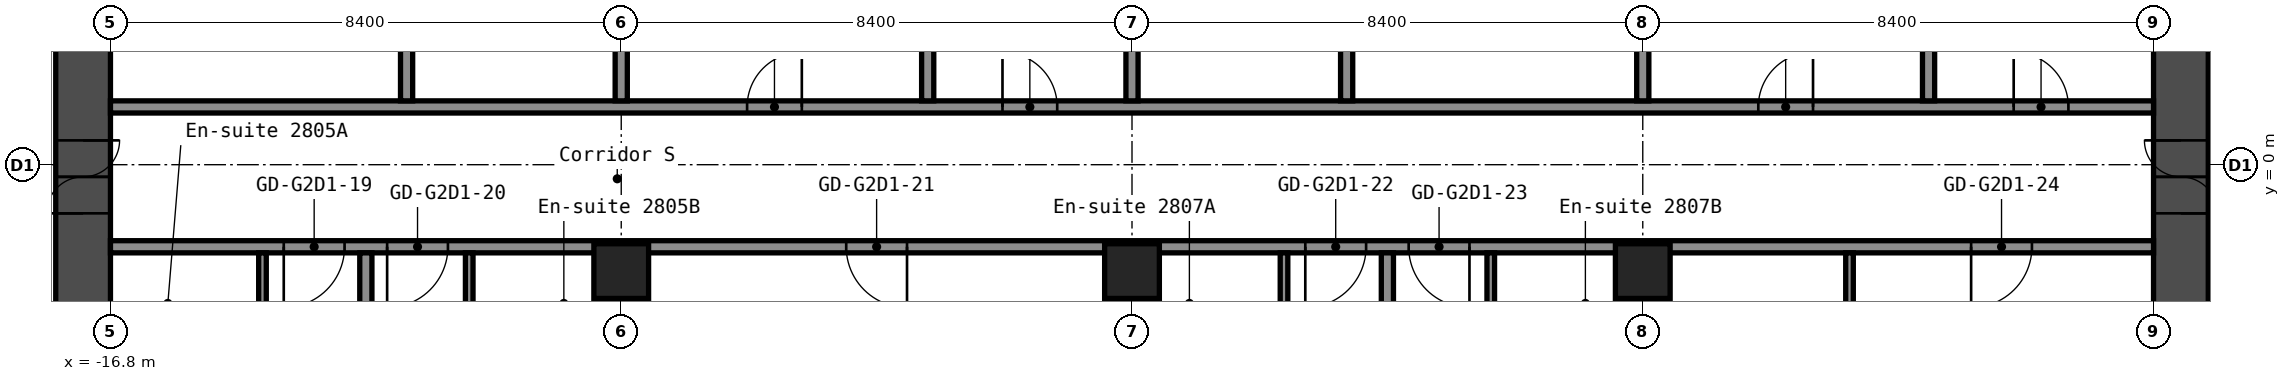
"""IFC4 building model, lengths in metres.
Left out: names, types, materials, properties, quantities, classifications, styles, units other than length and angle.
Written with IfcOpenShell. Run it as: python <this file> out.ifc"""

import sys

from ifc_helpers import new_model, si_unit, direction, frame, frame_2d, origin, origin_2d, place, context, subcontext, project, spatial, rectangle, hollow_rectangle, extrude, element, fill, save


model = new_model("IFC4")
c1 = context("Model", 3, precision=1e-05, world=origin(), true_north=direction((0.0, 1.0)))
c2 = subcontext(c1, "Body", "Model", "MODEL_VIEW")
j1 = project(units=[si_unit("LENGTHUNIT", "METRE"), si_unit("PLANEANGLEUNIT", "RADIAN")], contexts=[c1])
p1 = place(None, origin())
s1 = spatial("IfcSite", under=j1, at=p1, CompositionType="ELEMENT")
p2 = place(p1, origin())
s2 = spatial("IfcBuilding", under=s1, at=p2, CompositionType="ELEMENT")
p3 = place(p2, frame((0.0, 0.0, 101.0)))
s3 = spatial("IfcBuildingStorey", under=s2, at=p3, CompositionType="ELEMENT", Elevation=101.0)
for number, where, z_axis, x_axis in (
    (1, (-8.4, -1.75, 0.0), (0.0, 0.0, 1.0), (1.0, 0.0, 0.0)),
    (2, (0.0, -1.75, 0.0), (0.0, 0.0, 1.0), (1.0, 0.0, 0.0)),
    (3, (8.4, -1.75, 0.0), (0.0, 0.0, 1.0), (1.0, 0.0, 0.0)),
):
    element("IfcColumn", number, at=place(p3, frame(where, z_axis=z_axis, x_axis=x_axis)), inside=s3, PredefinedType="COLUMN", context=c2, shape_type="SweptSolid", body=[
        extrude(hollow_rectangle(XDim=0.9, YDim=0.9, WallThickness=0.036, at=origin_2d()), origin(), (0.0, 0.0, 1.0), 2.8),
    ])
p4 = place(p3, frame((-17.25, -8.4, 0.0), z_axis=(0.0, 0.0, 1.0), x_axis=(0.0, 1.0, 0.0)))
e4 = element("IfcWall", 4, at=p4, inside=s3, PredefinedType="SHEAR", context=c2, shape_type="SweptSolid", body=[
    extrude(rectangle(XDim=16.8, YDim=0.9, at=frame_2d((8.4, 0.0))), origin(), (0.0, 0.0, 1.0), 2.8),
])
p5 = place(p4, frame((7.6, 0.0, 0.0)))
e5 = element("IfcOpeningElement", 5, at=p5, cuts=e4, PredefinedType="OPENING", context=c2, shape_type="SweptSolid", body=[
    extrude(rectangle(XDim=1.2, YDim=2.1, at=frame_2d((0.6, 1.05))), frame((0.0, 0.46, 0.0), z_axis=(0.0, -1.0, 0.0), x_axis=(1.0, 0.0, 0.0)), (0.0, 0.0, 1.0), 0.92),
])
p6 = place(p3, frame((17.25, -8.4, 0.0), z_axis=(0.0, 0.0, 1.0), x_axis=(0.0, 1.0, 0.0)))
e6 = element("IfcWall", 6, at=p6, inside=s3, PredefinedType="SHEAR", context=c2, shape_type="SweptSolid", body=[
    extrude(rectangle(XDim=16.8, YDim=0.9, at=frame_2d((8.4, 0.0))), origin(), (0.0, 0.0, 1.0), 2.8),
])
p7 = place(p6, frame((7.6, 0.0, 0.0)))
e7 = element("IfcOpeningElement", 7, at=p7, cuts=e6, PredefinedType="OPENING", context=c2, shape_type="SweptSolid", body=[
    extrude(rectangle(XDim=1.2, YDim=2.1, at=frame_2d((0.6, 1.05))), frame((0.0, 0.46, 0.0), z_axis=(0.0, -1.0, 0.0), x_axis=(1.0, 0.0, 0.0)), (0.0, 0.0, 1.0), 0.92),
])
p8 = place(p3, frame((-16.8, -1.35, 0.0), z_axis=(0.0, 0.0, 1.0), x_axis=(1.0, 0.0, 0.0)))
e8 = element("IfcWall", 8, at=p8, inside=s3, PredefinedType="PARTITIONING", context=c2, shape_type="SweptSolid", body=[
    extrude(rectangle(XDim=33.6, YDim=0.2, at=frame_2d((16.8, 0.0))), origin(), (0.0, 0.0, 1.0), 2.8),
])
p9 = place(p8, frame((2.85, 0.0, 0.0)))
e9 = element("IfcOpeningElement", 9, at=p9, cuts=e8, PredefinedType="OPENING", context=c2, shape_type="SweptSolid", body=[
    extrude(rectangle(XDim=1.0, YDim=2.1, at=frame_2d((0.5, 1.05))), frame((0.0, 0.11, 0.0), z_axis=(0.0, -1.0, 0.0), x_axis=(1.0, 0.0, 0.0)), (0.0, 0.0, 1.0), 0.22),
])
p10 = place(p8, frame((4.55, 0.0, 0.0)))
e10 = element("IfcOpeningElement", 10, at=p10, cuts=e8, PredefinedType="OPENING", context=c2, shape_type="SweptSolid", body=[
    extrude(rectangle(XDim=1.0, YDim=2.1, at=frame_2d((0.5, 1.05))), frame((0.0, 0.11, 0.0), z_axis=(0.0, -1.0, 0.0), x_axis=(1.0, 0.0, 0.0)), (0.0, 0.0, 1.0), 0.22),
])
p11 = place(p8, frame((12.1, 0.0, 0.0)))
e11 = element("IfcOpeningElement", 11, at=p11, cuts=e8, PredefinedType="OPENING", context=c2, shape_type="SweptSolid", body=[
    extrude(rectangle(XDim=1.0, YDim=2.1, at=frame_2d((0.5, 1.05))), frame((0.0, 0.11, 0.0), z_axis=(0.0, -1.0, 0.0), x_axis=(1.0, 0.0, 0.0)), (0.0, 0.0, 1.0), 0.22),
])
p12 = place(p8, frame((19.65, 0.0, 0.0)))
e12 = element("IfcOpeningElement", 12, at=p12, cuts=e8, PredefinedType="OPENING", context=c2, shape_type="SweptSolid", body=[
    extrude(rectangle(XDim=1.0, YDim=2.1, at=frame_2d((0.5, 1.05))), frame((0.0, 0.11, 0.0), z_axis=(0.0, -1.0, 0.0), x_axis=(1.0, 0.0, 0.0)), (0.0, 0.0, 1.0), 0.22),
])
p13 = place(p8, frame((21.35, 0.0, 0.0)))
e13 = element("IfcOpeningElement", 13, at=p13, cuts=e8, PredefinedType="OPENING", context=c2, shape_type="SweptSolid", body=[
    extrude(rectangle(XDim=1.0, YDim=2.1, at=frame_2d((0.5, 1.05))), frame((0.0, 0.11, 0.0), z_axis=(0.0, -1.0, 0.0), x_axis=(1.0, 0.0, 0.0)), (0.0, 0.0, 1.0), 0.22),
])
p14 = place(p8, frame((30.6, 0.0, 0.0)))
e14 = element("IfcOpeningElement", 14, at=p14, cuts=e8, PredefinedType="OPENING", context=c2, shape_type="SweptSolid", body=[
    extrude(rectangle(XDim=1.0, YDim=2.1, at=frame_2d((0.5, 1.05))), frame((0.0, 0.11, 0.0), z_axis=(0.0, -1.0, 0.0), x_axis=(1.0, 0.0, 0.0)), (0.0, 0.0, 1.0), 0.22),
])
p15 = place(p3, frame((-16.8, 0.95, 0.0), z_axis=(0.0, 0.0, 1.0), x_axis=(1.0, 0.0, 0.0)))
e15 = element("IfcWall", 15, at=p15, inside=s3, PredefinedType="PARTITIONING", context=c2, shape_type="SweptSolid", body=[
    extrude(rectangle(XDim=33.6, YDim=0.2, at=frame_2d((16.8, 0.0))), origin(), (0.0, 0.0, 1.0), 2.8),
])
p16 = place(p15, frame((10.47, 0.0, 0.0)))
e16 = element("IfcOpeningElement", 16, at=p16, cuts=e15, PredefinedType="OPENING", context=c2, shape_type="SweptSolid", body=[
    extrude(rectangle(XDim=0.9, YDim=2.1, at=frame_2d((0.45, 1.05))), frame((0.0, 0.11, 0.0), z_axis=(0.0, -1.0, 0.0), x_axis=(1.0, 0.0, 0.0)), (0.0, 0.0, 1.0), 0.22),
])
p17 = place(p15, frame((14.67, 0.0, 0.0)))
e17 = element("IfcOpeningElement", 17, at=p17, cuts=e15, PredefinedType="OPENING", context=c2, shape_type="SweptSolid", body=[
    extrude(rectangle(XDim=0.9, YDim=2.1, at=frame_2d((0.45, 1.05))), frame((0.0, 0.11, 0.0), z_axis=(0.0, -1.0, 0.0), x_axis=(1.0, 0.0, 0.0)), (0.0, 0.0, 1.0), 0.22),
])
p18 = place(p15, frame((27.1, 0.0, 0.0)))
e18 = element("IfcOpeningElement", 18, at=p18, cuts=e15, PredefinedType="OPENING", context=c2, shape_type="SweptSolid", body=[
    extrude(rectangle(XDim=0.9, YDim=2.1, at=frame_2d((0.45, 1.05))), frame((0.0, 0.11, 0.0), z_axis=(0.0, -1.0, 0.0), x_axis=(1.0, 0.0, 0.0)), (0.0, 0.0, 1.0), 0.22),
])
p19 = place(p15, frame((31.3, 0.0, 0.0)))
e19 = element("IfcOpeningElement", 19, at=p19, cuts=e15, PredefinedType="OPENING", context=c2, shape_type="SweptSolid", body=[
    extrude(rectangle(XDim=0.9, YDim=2.1, at=frame_2d((0.45, 1.05))), frame((0.0, 0.11, 0.0), z_axis=(0.0, -1.0, 0.0), x_axis=(1.0, 0.0, 0.0)), (0.0, 0.0, 1.0), 0.22),
])
p20 = place(p3, frame((-14.3, -4.35, 0.0), z_axis=(0.0, 0.0, 1.0), x_axis=(0.0, 1.0, 0.0)))
e20 = element("IfcWall", 20, at=p20, inside=s3, PredefinedType="PARTITIONING", context=c2, shape_type="SweptSolid", body=[
    extrude(rectangle(XDim=2.9, YDim=0.125, at=frame_2d((1.45, 0.0))), origin(), (0.0, 0.0, 1.0), 2.8),
])
p21 = place(p20, frame((0.6, 0.0, 0.0)))
e21 = element("IfcOpeningElement", 21, at=p21, cuts=e20, PredefinedType="OPENING", context=c2, shape_type="SweptSolid", body=[
    extrude(rectangle(XDim=0.8, YDim=2.1, at=frame_2d((0.4, 1.05))), frame((0.0, 0.073, 0.0), z_axis=(0.0, -1.0, 0.0), x_axis=(1.0, 0.0, 0.0)), (0.0, 0.0, 1.0), 0.145),
])
p22 = place(p3, frame((-12.6, -15.55, 0.0), z_axis=(0.0, 0.0, 1.0), x_axis=(0.0, 1.0, 0.0)))
e22 = element("IfcWall", 22, at=p22, inside=s3, PredefinedType="PARTITIONING", context=c2, shape_type="SweptSolid", body=[
    extrude(rectangle(XDim=14.1, YDim=0.2, at=frame_2d((7.05, 0.0))), origin(), (0.0, 0.0, 1.0), 2.8),
])
p23 = place(p3, frame((-11.93, 1.05, 0.0), z_axis=(0.0, 0.0, 1.0), x_axis=(0.0, 1.0, 0.0)))
e23 = element("IfcWall", 23, at=p23, inside=s3, PredefinedType="PARTITIONING", context=c2, shape_type="SweptSolid", body=[
    extrude(rectangle(XDim=5.9, YDim=0.2, at=frame_2d((2.95, 0.0))), origin(), (0.0, 0.0, 1.0), 2.8),
])
p24 = place(p3, frame((-10.9, -4.35, 0.0), z_axis=(0.0, 0.0, 1.0), x_axis=(0.0, 1.0, 0.0)))
e24 = element("IfcWall", 24, at=p24, inside=s3, PredefinedType="PARTITIONING", context=c2, shape_type="SweptSolid", body=[
    extrude(rectangle(XDim=2.9, YDim=0.125, at=frame_2d((1.45, 0.0))), origin(), (0.0, 0.0, 1.0), 2.8),
])
p25 = place(p24, frame((0.6, 0.0, 0.0)))
e25 = element("IfcOpeningElement", 25, at=p25, cuts=e24, PredefinedType="OPENING", context=c2, shape_type="SweptSolid", body=[
    extrude(rectangle(XDim=0.8, YDim=2.1, at=frame_2d((0.4, 1.05))), frame((0.0, 0.073, 0.0), z_axis=(0.0, -1.0, 0.0), x_axis=(1.0, 0.0, 0.0)), (0.0, 0.0, 1.0), 0.145),
])
p26 = place(p3, frame((-8.4, -15.55, 0.0), z_axis=(0.0, 0.0, 1.0), x_axis=(0.0, 1.0, 0.0)))
e26 = element("IfcWall", 26, at=p26, inside=s3, PredefinedType="PARTITIONING", context=c2, shape_type="SweptSolid", body=[
    extrude(rectangle(XDim=13.36, YDim=0.2, at=frame_2d((6.68, 0.0))), origin(), (0.0, 0.0, 1.0), 2.8),
])
for number, where, z_axis, x_axis in (
    (27, (-8.4, 1.05, 0.0), (0.0, 0.0, 1.0), (0.0, 1.0, 0.0)),
    (28, (-3.36, 1.05, 0.0), (0.0, 0.0, 1.0), (0.0, 1.0, 0.0)),
):
    element("IfcWall", number, at=place(p3, frame(where, z_axis=z_axis, x_axis=x_axis)), inside=s3, PredefinedType="PARTITIONING", context=c2, shape_type="SweptSolid", body=[
        extrude(rectangle(XDim=5.9, YDim=0.2, at=frame_2d((2.95, 0.0))), origin(), (0.0, 0.0, 1.0), 2.8),
    ])
p27 = place(p3, frame((0.0, -15.55, 0.0), z_axis=(0.0, 0.0, 1.0), x_axis=(0.0, 1.0, 0.0)))
e29 = element("IfcWall", 29, at=p27, inside=s3, PredefinedType="PARTITIONING", context=c2, shape_type="SweptSolid", body=[
    extrude(rectangle(XDim=13.36, YDim=0.2, at=frame_2d((6.68, 0.0))), origin(), (0.0, 0.0, 1.0), 2.8),
])
p28 = place(p3, frame((0.0, 1.05, 0.0), z_axis=(0.0, 0.0, 1.0), x_axis=(0.0, 1.0, 0.0)))
e30 = element("IfcWall", 30, at=p28, inside=s3, PredefinedType="PARTITIONING", context=c2, shape_type="SweptSolid", body=[
    extrude(rectangle(XDim=5.9, YDim=0.2, at=frame_2d((2.95, 0.0))), origin(), (0.0, 0.0, 1.0), 2.8),
])
p29 = place(p3, frame((2.5, -4.35, 0.0), z_axis=(0.0, 0.0, 1.0), x_axis=(0.0, 1.0, 0.0)))
e31 = element("IfcWall", 31, at=p29, inside=s3, PredefinedType="PARTITIONING", context=c2, shape_type="SweptSolid", body=[
    extrude(rectangle(XDim=2.9, YDim=0.125, at=frame_2d((1.45, 0.0))), origin(), (0.0, 0.0, 1.0), 2.8),
])
p30 = place(p29, frame((0.6, 0.0, 0.0)))
e32 = element("IfcOpeningElement", 32, at=p30, cuts=e31, PredefinedType="OPENING", context=c2, shape_type="SweptSolid", body=[
    extrude(rectangle(XDim=0.8, YDim=2.1, at=frame_2d((0.4, 1.05))), frame((0.0, 0.073, 0.0), z_axis=(0.0, -1.0, 0.0), x_axis=(1.0, 0.0, 0.0)), (0.0, 0.0, 1.0), 0.145),
])
p31 = place(p3, frame((3.53, 1.05, 0.0), z_axis=(0.0, 0.0, 1.0), x_axis=(0.0, 1.0, 0.0)))
e33 = element("IfcWall", 33, at=p31, inside=s3, PredefinedType="PARTITIONING", context=c2, shape_type="SweptSolid", body=[
    extrude(rectangle(XDim=5.9, YDim=0.2, at=frame_2d((2.95, 0.0))), origin(), (0.0, 0.0, 1.0), 2.8),
])
p32 = place(p3, frame((4.2, -15.55, 0.0), z_axis=(0.0, 0.0, 1.0), x_axis=(0.0, 1.0, 0.0)))
e34 = element("IfcWall", 34, at=p32, inside=s3, PredefinedType="PARTITIONING", context=c2, shape_type="SweptSolid", body=[
    extrude(rectangle(XDim=14.1, YDim=0.2, at=frame_2d((7.05, 0.0))), origin(), (0.0, 0.0, 1.0), 2.8),
])
p33 = place(p3, frame((5.9, -4.35, 0.0), z_axis=(0.0, 0.0, 1.0), x_axis=(0.0, 1.0, 0.0)))
e35 = element("IfcWall", 35, at=p33, inside=s3, PredefinedType="PARTITIONING", context=c2, shape_type="SweptSolid", body=[
    extrude(rectangle(XDim=2.9, YDim=0.125, at=frame_2d((1.45, 0.0))), origin(), (0.0, 0.0, 1.0), 2.8),
])
p34 = place(p33, frame((0.6, 0.0, 0.0)))
e36 = element("IfcOpeningElement", 36, at=p34, cuts=e35, PredefinedType="OPENING", context=c2, shape_type="SweptSolid", body=[
    extrude(rectangle(XDim=0.8, YDim=2.1, at=frame_2d((0.4, 1.05))), frame((0.0, 0.073, 0.0), z_axis=(0.0, -1.0, 0.0), x_axis=(1.0, 0.0, 0.0)), (0.0, 0.0, 1.0), 0.145),
])
p35 = place(p3, frame((8.4, -15.55, 0.0), z_axis=(0.0, 0.0, 1.0), x_axis=(0.0, 1.0, 0.0)))
e37 = element("IfcWall", 37, at=p35, inside=s3, PredefinedType="PARTITIONING", context=c2, shape_type="SweptSolid", body=[
    extrude(rectangle(XDim=13.36, YDim=0.2, at=frame_2d((6.68, 0.0))), origin(), (0.0, 0.0, 1.0), 2.8),
])
p36 = place(p3, frame((8.4, 1.05, 0.0), z_axis=(0.0, 0.0, 1.0), x_axis=(0.0, 1.0, 0.0)))
e38 = element("IfcWall", 38, at=p36, inside=s3, PredefinedType="PARTITIONING", context=c2, shape_type="SweptSolid", body=[
    extrude(rectangle(XDim=5.9, YDim=0.2, at=frame_2d((2.95, 0.0))), origin(), (0.0, 0.0, 1.0), 2.8),
])
p37 = place(p3, frame((11.8, -4.75, 0.0), z_axis=(0.0, 0.0, 1.0), x_axis=(0.0, 1.0, 0.0)))
e39 = element("IfcWall", 39, at=p37, inside=s3, PredefinedType="PARTITIONING", context=c2, shape_type="SweptSolid", body=[
    extrude(rectangle(XDim=3.3, YDim=0.125, at=frame_2d((1.65, 0.0))), origin(), (0.0, 0.0, 1.0), 2.8),
])
p38 = place(p3, frame((13.1, 1.05, 0.0), z_axis=(0.0, 0.0, 1.0), x_axis=(0.0, 1.0, 0.0)))
e40 = element("IfcWall", 40, at=p38, inside=s3, PredefinedType="PARTITIONING", context=c2, shape_type="SweptSolid", body=[
    extrude(rectangle(XDim=5.9, YDim=0.2, at=frame_2d((2.95, 0.0))), origin(), (0.0, 0.0, 1.0), 2.8),
])
p39 = place(p5, origin())
e41 = element("IfcDoor", 41, at=p39, inside=s3, OperationType="DOUBLE_DOOR_SINGLE_SWING", PredefinedType="DOOR", context=c2, shape_type="SweptSolid", body=[
    extrude(rectangle(XDim=1.2, YDim=2.1, at=frame_2d((0.6, 1.05))), frame((0.0, 0.025, 0.0), z_axis=(0.0, -1.0, 0.0), x_axis=(1.0, 0.0, 0.0)), (0.0, 0.0, 1.0), 0.05),
])
fill(e5, e41)
p40 = place(p7, origin())
e42 = element("IfcDoor", 42, at=p40, inside=s3, OperationType="DOUBLE_DOOR_SINGLE_SWING", PredefinedType="DOOR", context=c2, shape_type="SweptSolid", body=[
    extrude(rectangle(XDim=1.2, YDim=2.1, at=frame_2d((0.6, 1.05))), frame((0.0, 0.025, 0.0), z_axis=(0.0, -1.0, 0.0), x_axis=(1.0, 0.0, 0.0)), (0.0, 0.0, 1.0), 0.05),
])
fill(e7, e42)
p41 = place(p9, origin())
e43 = element("IfcDoor", 43, at=p41, inside=s3, OperationType="SINGLE_SWING_LEFT", PredefinedType="DOOR", context=c2, shape_type="SweptSolid", body=[
    extrude(rectangle(XDim=1.0, YDim=2.1, at=frame_2d((0.5, 1.05))), frame((0.0, 0.025, 0.0), z_axis=(0.0, -1.0, 0.0), x_axis=(1.0, 0.0, 0.0)), (0.0, 0.0, 1.0), 0.05),
])
fill(e9, e43)
p42 = place(p10, origin())
e44 = element("IfcDoor", 44, at=p42, inside=s3, OperationType="SINGLE_SWING_LEFT", PredefinedType="DOOR", context=c2, shape_type="SweptSolid", body=[
    extrude(rectangle(XDim=1.0, YDim=2.1, at=frame_2d((0.5, 1.05))), frame((0.0, 0.025, 0.0), z_axis=(0.0, -1.0, 0.0), x_axis=(1.0, 0.0, 0.0)), (0.0, 0.0, 1.0), 0.05),
])
fill(e10, e44)
p43 = place(p11, origin())
e45 = element("IfcDoor", 45, at=p43, inside=s3, OperationType="SINGLE_SWING_RIGHT", PredefinedType="DOOR", context=c2, shape_type="SweptSolid", body=[
    extrude(rectangle(XDim=1.0, YDim=2.1, at=frame_2d((0.5, 1.05))), frame((0.0, 0.025, 0.0), z_axis=(0.0, -1.0, 0.0), x_axis=(1.0, 0.0, 0.0)), (0.0, 0.0, 1.0), 0.05),
])
fill(e11, e45)
p44 = place(p12, origin())
e46 = element("IfcDoor", 46, at=p44, inside=s3, OperationType="SINGLE_SWING_LEFT", PredefinedType="DOOR", context=c2, shape_type="SweptSolid", body=[
    extrude(rectangle(XDim=1.0, YDim=2.1, at=frame_2d((0.5, 1.05))), frame((0.0, 0.025, 0.0), z_axis=(0.0, -1.0, 0.0), x_axis=(1.0, 0.0, 0.0)), (0.0, 0.0, 1.0), 0.05),
])
fill(e12, e46)
p45 = place(p13, origin())
e47 = element("IfcDoor", 47, at=p45, inside=s3, OperationType="SINGLE_SWING_RIGHT", PredefinedType="DOOR", context=c2, shape_type="SweptSolid", body=[
    extrude(rectangle(XDim=1.0, YDim=2.1, at=frame_2d((0.5, 1.05))), frame((0.0, 0.025, 0.0), z_axis=(0.0, -1.0, 0.0), x_axis=(1.0, 0.0, 0.0)), (0.0, 0.0, 1.0), 0.05),
])
fill(e13, e47)
p46 = place(p14, origin())
e48 = element("IfcDoor", 48, at=p46, inside=s3, OperationType="SINGLE_SWING_LEFT", PredefinedType="DOOR", context=c2, shape_type="SweptSolid", body=[
    extrude(rectangle(XDim=1.0, YDim=2.1, at=frame_2d((0.5, 1.05))), frame((0.0, 0.025, 0.0), z_axis=(0.0, -1.0, 0.0), x_axis=(1.0, 0.0, 0.0)), (0.0, 0.0, 1.0), 0.05),
])
fill(e14, e48)
p47 = place(p16, origin())
e49 = element("IfcDoor", 49, at=p47, inside=s3, OperationType="SINGLE_SWING_LEFT", PredefinedType="DOOR", context=c2, shape_type="SweptSolid", body=[
    extrude(rectangle(XDim=0.9, YDim=2.1, at=frame_2d((0.45, 1.05))), frame((0.0, 0.025, 0.0), z_axis=(0.0, -1.0, 0.0), x_axis=(1.0, 0.0, 0.0)), (0.0, 0.0, 1.0), 0.05),
])
fill(e16, e49)
p48 = place(p17, origin())
e50 = element("IfcDoor", 50, at=p48, inside=s3, OperationType="SINGLE_SWING_RIGHT", PredefinedType="DOOR", context=c2, shape_type="SweptSolid", body=[
    extrude(rectangle(XDim=0.9, YDim=2.1, at=frame_2d((0.45, 1.05))), frame((0.0, 0.025, 0.0), z_axis=(0.0, -1.0, 0.0), x_axis=(1.0, 0.0, 0.0)), (0.0, 0.0, 1.0), 0.05),
])
fill(e17, e50)
p49 = place(p18, origin())
e51 = element("IfcDoor", 51, at=p49, inside=s3, OperationType="SINGLE_SWING_LEFT", PredefinedType="DOOR", context=c2, shape_type="SweptSolid", body=[
    extrude(rectangle(XDim=0.9, YDim=2.1, at=frame_2d((0.45, 1.05))), frame((0.0, 0.025, 0.0), z_axis=(0.0, -1.0, 0.0), x_axis=(1.0, 0.0, 0.0)), (0.0, 0.0, 1.0), 0.05),
])
fill(e18, e51)
p50 = place(p19, origin())
e52 = element("IfcDoor", 52, at=p50, inside=s3, OperationType="SINGLE_SWING_RIGHT", PredefinedType="DOOR", context=c2, shape_type="SweptSolid", body=[
    extrude(rectangle(XDim=0.9, YDim=2.1, at=frame_2d((0.45, 1.05))), frame((0.0, 0.025, 0.0), z_axis=(0.0, -1.0, 0.0), x_axis=(1.0, 0.0, 0.0)), (0.0, 0.0, 1.0), 0.05),
])
fill(e19, e52)
save(model, sys.argv[1])
